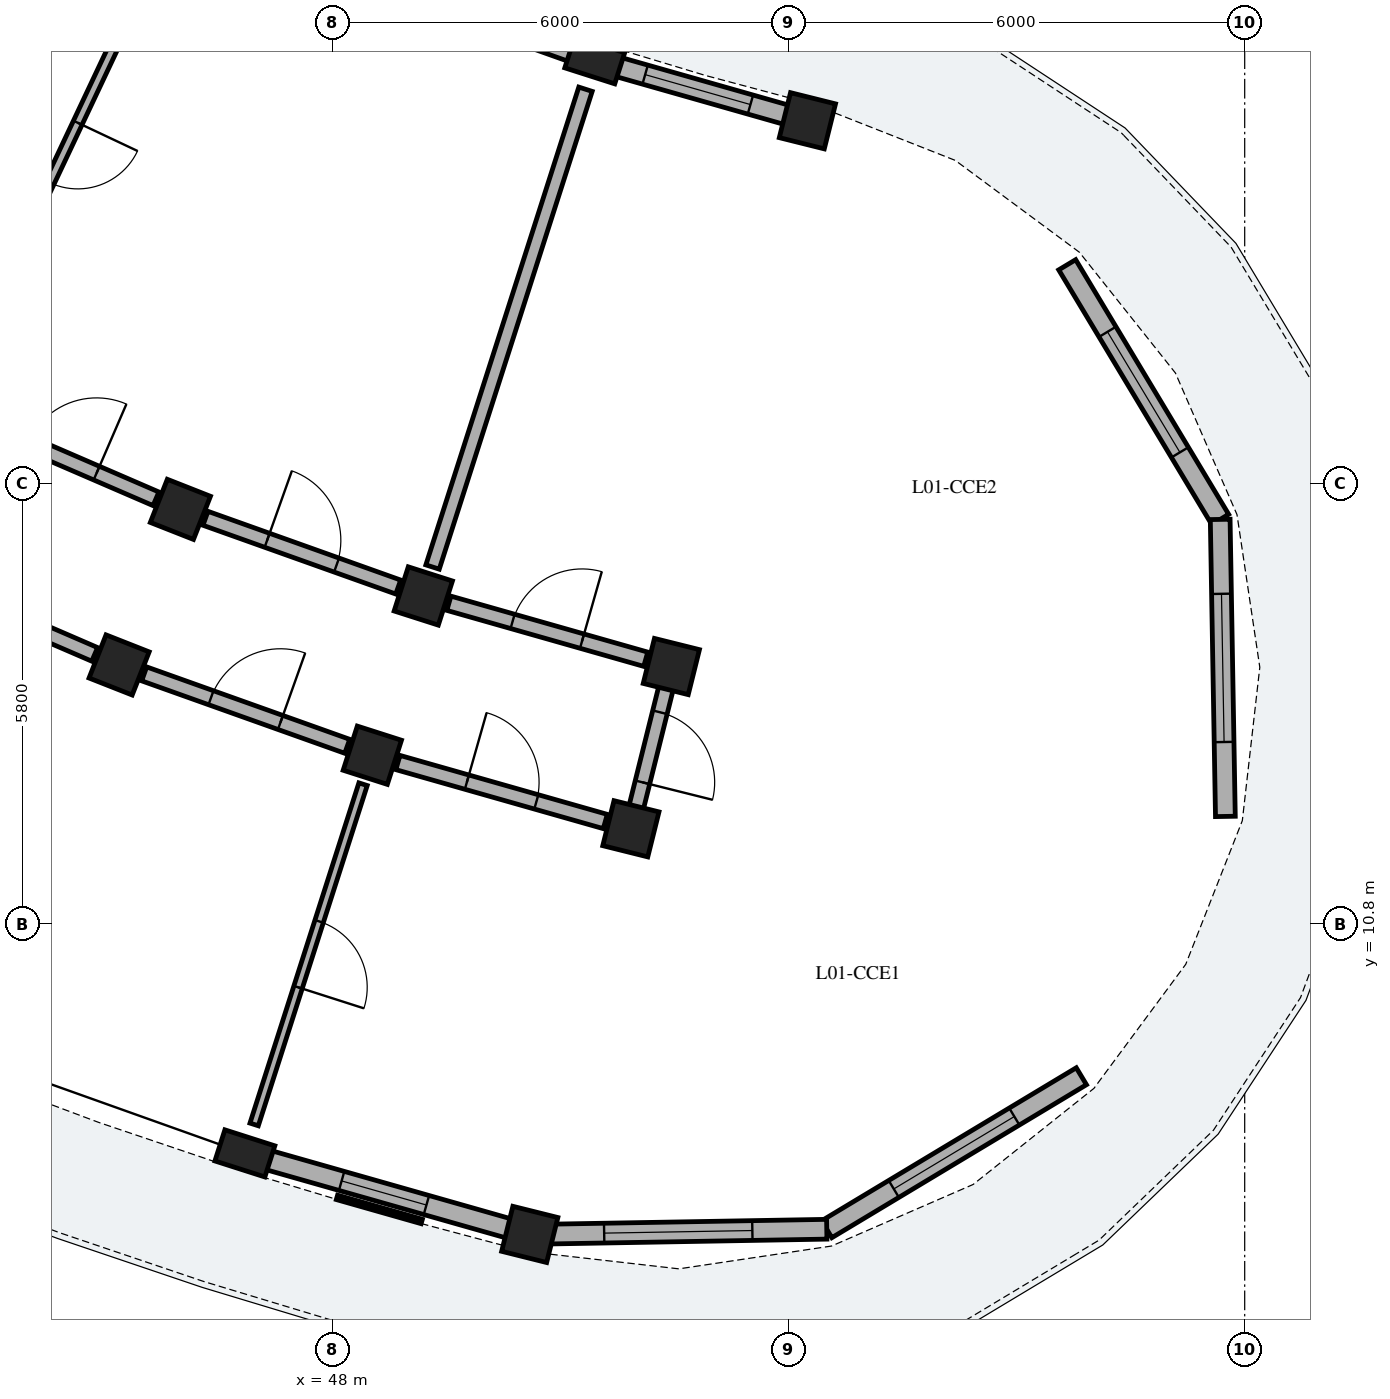
"""IFC4 building model, lengths in metres.
Left out: names, types, materials, properties, quantities, classifications, styles, units other than length and angle.
Written with IfcOpenShell. Run it as: python <this file> out.ifc"""

import sys

from ifc_helpers import new_model, si_unit, direction, frame, frame_2d, origin, origin_2d, place, context, subcontext, project, spatial, rectangle, extrude, element, fill, save


model = new_model("IFC4")
c1 = context("Model", 3, precision=1e-05, world=origin(), true_north=direction((0.0, 1.0)))
c2 = subcontext(c1, "Body", "Model", "MODEL_VIEW")
j1 = project(units=[si_unit("LENGTHUNIT", "METRE"), si_unit("PLANEANGLEUNIT", "RADIAN")], contexts=[c1])
p1 = place(None, origin())
s1 = spatial("IfcSite", under=j1, at=p1, CompositionType="ELEMENT")
p2 = place(p1, origin())
s2 = spatial("IfcBuilding", under=s1, at=p2, CompositionType="ELEMENT")
p3 = place(p2, frame((0.0, 0.0, 4.76)))
s3 = spatial("IfcBuildingStorey", under=s2, at=p3, CompositionType="ELEMENT", Elevation=4.76)
for number, where, z_axis, x_axis in (
    (1, (45.997, 16.258, 0.0), (0.0, 0.0, 1.0), (-0.367, -0.93, 0.0)),
    (2, (45.191, 14.211, 0.0), (0.0, 0.0, 1.0), (-0.367, -0.93, 0.0)),
):
    element("IfcColumn", number, at=place(p3, frame(where, z_axis=z_axis, x_axis=x_axis)), inside=s3, PredefinedType="COLUMN", context=c2, shape_type="SweptSolid", body=[
        extrude(rectangle(XDim=0.61, YDim=0.61, at=origin_2d()), origin(), (0.0, 0.0, 1.0), 3.825),
    ])
p4 = place(p3, frame((51.449, 22.166, 0.0), z_axis=(0.0, 0.0, 1.0), x_axis=(-0.304864299028, -0.952395799643, 0.0)))
e3 = element("IfcColumn", 3, at=p4, inside=s3, PredefinedType="PILASTER", context=c2, shape_type="SweptSolid", body=[
    extrude(rectangle(XDim=0.43, YDim=0.69, at=origin_2d()), origin(), (0.0, 0.0, 1.0), 3.825),
])
for number, where, z_axis, x_axis in (
    (4, (49.193, 15.118, 0.0), (0.0, 0.0, 1.0), (-0.305, -0.952, 0.0)),
    (5, (48.522, 13.023, 0.0), (0.0, 0.0, 1.0), (-0.305, -0.952, 0.0)),
):
    element("IfcColumn", number, at=place(p3, frame(where, z_axis=z_axis, x_axis=x_axis)), inside=s3, PredefinedType="COLUMN", context=c2, shape_type="SweptSolid", body=[
        extrude(rectangle(XDim=0.61, YDim=0.61, at=origin_2d()), origin(), (0.0, 0.0, 1.0), 3.825),
    ])
p5 = place(p3, frame((46.845, 7.785, 0.0), z_axis=(0.0, 0.0, 1.0), x_axis=(-0.304864299028, -0.952395799643, 0.0)))
e6 = element("IfcColumn", 6, at=p5, inside=s3, PredefinedType="PILASTER", context=c2, shape_type="SweptSolid", body=[
    extrude(rectangle(XDim=0.43, YDim=0.69, at=origin_2d()), origin(), (0.0, 0.0, 1.0), 3.825),
])
for number, where, z_axis, x_axis in (
    (7, (54.247, 21.37, 0.0), (0.0, 0.0, 1.0), (-0.242, -0.97, 0.0)),
    (8, (52.456, 14.19, 0.0), (0.0, 0.0, 1.0), (-0.242, -0.97, 0.0)),
    (9, (51.924, 12.055, 0.0), (0.0, 0.0, 1.0), (-0.242, -0.97, 0.0)),
    (10, (50.594, 6.719, 0.0), (0.0, 0.0, 1.0), (-0.242, -0.97, 0.0)),
):
    element("IfcColumn", number, at=place(p3, frame(where, z_axis=z_axis, x_axis=x_axis)), inside=s3, PredefinedType="COLUMN", context=c2, shape_type="SweptSolid", body=[
        extrude(rectangle(XDim=0.61, YDim=0.61, at=origin_2d()), origin(), (0.0, 0.0, 1.0), 3.825),
    ])
p6 = place(p3, frame((48.968, 23.051, 0.0), z_axis=(0.0, 0.0, 1.0), x_axis=(0.941897456242, -0.335900553623, 0.0)))
e11 = element("IfcWall", 11, at=p6, inside=s3, PredefinedType="SOLIDWALL", context=c2, shape_type="SweptSolid", body=[
    extrude(rectangle(XDim=2.449, YDim=0.26, at=frame_2d((1.224, 0.0))), origin(), (0.0, 0.0, 1.0), 3.075),
])
p7 = place(p6, frame((0.734, 0.0, 0.0)))
e12 = element("IfcOpeningElement", 12, at=p7, cuts=e11, PredefinedType="OPENING", context=c2, shape_type="SweptSolid", body=[
    extrude(rectangle(XDim=0.98, YDim=2.12, at=frame_2d((0.49, 1.06))), frame((0.0, 0.14, 0.0), z_axis=(0.0, -1.0, 0.0), x_axis=(1.0, 0.0, 0.0)), (0.0, 0.0, 1.0), 0.28),
])
p8 = place(p3, frame((47.023, 7.734, 0.0), z_axis=(0.0, 0.0, 1.0), x_axis=(0.961876981915, -0.273482488766, 0.0)))
e13 = element("IfcWall", 13, at=p8, inside=s3, PredefinedType="SOLIDWALL", context=c2, shape_type="SweptSolid", body=[
    extrude(rectangle(XDim=3.437, YDim=0.26, at=frame_2d((1.719, 0.0))), origin(), (0.0, 0.0, 1.0), 3.075),
])
p9 = place(p8, frame((1.138, 0.0, 0.55)))
e14 = element("IfcOpeningElement", 14, at=p9, cuts=e13, PredefinedType="OPENING", context=c2, shape_type="SweptSolid", body=[
    extrude(rectangle(XDim=1.16, YDim=1.485, at=frame_2d((0.58, 0.743))), frame((0.0, 0.14, 0.0), z_axis=(0.0, -1.0, 0.0), x_axis=(1.0, 0.0, 0.0)), (0.0, 0.0, 1.0), 0.28),
])
p10 = place(p3, frame((51.627, 22.115, 0.0), z_axis=(0.0, 0.0, 1.0), x_axis=(0.961854311059, -0.273562212847, 0.0)))
e15 = element("IfcWall", 15, at=p10, inside=s3, PredefinedType="SOLIDWALL", context=c2, shape_type="SweptSolid", body=[
    extrude(rectangle(XDim=2.449, YDim=0.26, at=frame_2d((1.225, 0.0))), origin(), (0.0, 0.0, 1.0), 3.075),
])
p11 = place(p10, frame((0.504, 0.0, 0.55)))
e16 = element("IfcOpeningElement", 16, at=p11, cuts=e15, PredefinedType="OPENING", context=c2, shape_type="SweptSolid", body=[
    extrude(rectangle(XDim=1.44, YDim=1.66, at=frame_2d((0.72, 0.83))), frame((0.0, 0.14, 0.0), z_axis=(0.0, -1.0, 0.0), x_axis=(1.0, 0.0, 0.0)), (0.0, 0.0, 1.0), 0.28),
])
p12 = place(p3, frame((57.665, 19.476, 0.0), z_axis=(0.0, 0.0, 1.0), x_axis=(0.515019321998, -0.857178568309, 0.0)))
e17 = element("IfcWall", 17, at=p12, inside=s3, PredefinedType="SOLIDWALL", context=c2, shape_type="SweptSolid", body=[
    extrude(rectangle(XDim=3.908, YDim=0.26, at=frame_2d((1.954, 0.0))), origin(), (0.0, 0.0, 1.0), 3.075),
])
p13 = place(p12, frame((1.029, 0.0, 0.4)))
e18 = element("IfcOpeningElement", 18, at=p13, cuts=e17, PredefinedType="OPENING", context=c2, shape_type="SweptSolid", body=[
    extrude(rectangle(XDim=1.85, YDim=1.72, at=frame_2d((0.925, 0.86))), frame((0.0, 0.14, 0.0), z_axis=(0.0, -1.0, 0.0), x_axis=(1.0, 0.0, 0.0)), (0.0, 0.0, 1.0), 0.28),
])
p14 = place(p3, frame((59.677, 16.126, 0.0), z_axis=(0.0, 0.0, 1.0), x_axis=(0.017490763899, -0.999847024888, 0.0)))
e19 = element("IfcWall", 19, at=p14, inside=s3, PredefinedType="SOLIDWALL", context=c2, shape_type="SweptSolid", body=[
    extrude(rectangle(XDim=3.908, YDim=0.26, at=frame_2d((1.954, 0.0))), origin(), (0.0, 0.0, 1.0), 3.075),
])
p15 = place(p14, frame((0.979, 0.0, 0.4)))
e20 = element("IfcOpeningElement", 20, at=p15, cuts=e19, PredefinedType="OPENING", context=c2, shape_type="SweptSolid", body=[
    extrude(rectangle(XDim=1.95, YDim=1.78, at=frame_2d((0.975, 0.89))), frame((0.0, 0.14, 0.0), z_axis=(0.0, -1.0, 0.0), x_axis=(1.0, 0.0, 0.0)), (0.0, 0.0, 1.0), 0.28),
])
p16 = place(p3, frame((57.851, 8.8, 0.0), z_axis=(0.0, 0.0, 1.0), x_axis=(-0.85715098885, -0.515065221417, 0.0)))
e21 = element("IfcWall", 21, at=p16, inside=s3, PredefinedType="SOLIDWALL", context=c2, shape_type="SweptSolid", body=[
    extrude(rectangle(XDim=3.908, YDim=0.26, at=frame_2d((1.954, 0.0))), origin(), (0.0, 0.0, 1.0), 3.075),
])
p17 = place(p16, frame((1.029, 0.0, 0.4)))
e22 = element("IfcOpeningElement", 22, at=p17, cuts=e21, PredefinedType="OPENING", context=c2, shape_type="SweptSolid", body=[
    extrude(rectangle(XDim=1.85, YDim=1.72, at=frame_2d((0.925, 0.86))), frame((0.0, 0.14, 0.0), z_axis=(0.0, -1.0, 0.0), x_axis=(1.0, 0.0, 0.0)), (0.0, 0.0, 1.0), 0.28),
])
p18 = place(p3, frame((54.501, 6.787, 0.0), z_axis=(0.0, 0.0, 1.0), x_axis=(-0.999848115368, -0.017428315893, 0.0)))
e23 = element("IfcWall", 23, at=p18, inside=s3, PredefinedType="SOLIDWALL", context=c2, shape_type="SweptSolid", body=[
    extrude(rectangle(XDim=3.908, YDim=0.26, at=frame_2d((1.954, 0.0))), origin(), (0.0, 0.0, 1.0), 3.075),
])
p19 = place(p18, frame((0.979, 0.0, 0.4)))
e24 = element("IfcOpeningElement", 24, at=p19, cuts=e23, PredefinedType="OPENING", context=c2, shape_type="SweptSolid", body=[
    extrude(rectangle(XDim=1.95, YDim=1.78, at=frame_2d((0.975, 0.89))), frame((0.0, 0.14, 0.0), z_axis=(0.0, -1.0, 0.0), x_axis=(1.0, 0.0, 0.0)), (0.0, 0.0, 1.0), 0.28),
])
p20 = place(p3, frame((45.868, 23.935, 0.0), z_axis=(0.0, 0.0, 1.0), x_axis=(-0.426573573579, -0.904452865728, 0.0)))
e25 = element("IfcWall", 25, at=p20, inside=s3, PredefinedType="PARTITIONING", context=c2, shape_type="SweptSolid", body=[
    extrude(rectangle(XDim=6.6, YDim=0.125, at=frame_2d((3.3, 0.0))), origin(), (0.0, 0.0, 1.0), 3.09),
])
p21 = place(p20, frame((2.865, 0.0, 0.0)))
e26 = element("IfcOpeningElement", 26, at=p21, cuts=e25, PredefinedType="OPENING", context=c2, shape_type="SweptSolid", body=[
    extrude(rectangle(XDim=0.87, YDim=2.08, at=frame_2d((0.435, 1.04))), frame((0.0, 0.073, 0.0), z_axis=(0.0, -1.0, 0.0), x_axis=(1.0, 0.0, 0.0)), (0.0, 0.0, 1.0), 0.145),
])
p22 = place(p3, frame((42.265, 15.475, 0.0), z_axis=(0.0, 0.0, 1.0), x_axis=(0.917943439406, -0.396711282991, 0.0)))
e27 = element("IfcWall", 27, at=p22, inside=s3, PredefinedType="PARTITIONING", context=c2, shape_type="SweptSolid", body=[
    extrude(rectangle(XDim=2.837, YDim=0.195, at=frame_2d((1.418, 0.0))), origin(), (0.0, 0.0, 1.0), 3.09),
])
p23 = place(p22, frame((0.924, 0.0, 0.0)))
e28 = element("IfcOpeningElement", 28, at=p23, cuts=e27, PredefinedType="OPENING", context=c2, shape_type="SweptSolid", body=[
    extrude(rectangle(XDim=0.99, YDim=2.16, at=frame_2d((0.495, 1.08))), frame((0.0, 0.107, 0.0), z_axis=(0.0, -1.0, 0.0), x_axis=(1.0, 0.0, 0.0)), (0.0, 0.0, 1.0), 0.215),
])
p24 = place(p3, frame((43.204, 17.465, 0.0), z_axis=(0.0, 0.0, 1.0), x_axis=(0.91793557165, -0.39672948756, 0.0)))
e29 = element("IfcWall", 29, at=p24, inside=s3, PredefinedType="PARTITIONING", context=c2, shape_type="SweptSolid", body=[
    extrude(rectangle(XDim=2.693, YDim=0.195, at=frame_2d((1.346, 0.0))), origin(), (0.0, 0.0, 1.0), 3.09),
])
p25 = place(p24, frame((0.852, 0.0, 0.0)))
e30 = element("IfcOpeningElement", 30, at=p25, cuts=e29, PredefinedType="OPENING", context=c2, shape_type="SweptSolid", body=[
    extrude(rectangle(XDim=0.99, YDim=2.16, at=frame_2d((0.495, 1.08))), frame((0.0, 0.107, 0.0), z_axis=(0.0, -1.0, 0.0), x_axis=(1.0, 0.0, 0.0)), (0.0, 0.0, 1.0), 0.215),
])
p26 = place(p3, frame((45.52, 14.093, 0.0), z_axis=(0.0, 0.0, 1.0), x_axis=(0.941930628611, -0.335807520589, 0.0)))
e31 = element("IfcWall", 31, at=p26, inside=s3, PredefinedType="PARTITIONING", context=c2, shape_type="SweptSolid", body=[
    extrude(rectangle(XDim=2.837, YDim=0.195, at=frame_2d((1.418, 0.0))), origin(), (0.0, 0.0, 1.0), 3.09),
])
p27 = place(p26, frame((0.934, 0.0, 0.0)))
e32 = element("IfcOpeningElement", 32, at=p27, cuts=e31, PredefinedType="OPENING", context=c2, shape_type="SweptSolid", body=[
    extrude(rectangle(XDim=0.97, YDim=2.15, at=frame_2d((0.485, 1.075))), frame((0.0, 0.107, 0.0), z_axis=(0.0, -1.0, 0.0), x_axis=(1.0, 0.0, 0.0)), (0.0, 0.0, 1.0), 0.215),
])
p28 = place(p3, frame((46.327, 16.14, 0.0), z_axis=(0.0, 0.0, 1.0), x_axis=(0.941895652647, -0.335905611036, 0.0)))
e33 = element("IfcWall", 33, at=p28, inside=s3, PredefinedType="PARTITIONING", context=c2, shape_type="SweptSolid", body=[
    extrude(rectangle(XDim=2.693, YDim=0.195, at=frame_2d((1.346, 0.0))), origin(), (0.0, 0.0, 1.0), 3.09),
])
p29 = place(p28, frame((0.862, 0.0, 0.0)))
e34 = element("IfcOpeningElement", 34, at=p29, cuts=e33, PredefinedType="OPENING", context=c2, shape_type="SweptSolid", body=[
    extrude(rectangle(XDim=0.97, YDim=2.15, at=frame_2d((0.485, 1.075))), frame((0.0, 0.107, 0.0), z_axis=(0.0, -1.0, 0.0), x_axis=(1.0, 0.0, 0.0)), (0.0, 0.0, 1.0), 0.215),
])
p30 = place(p3, frame((48.4, 12.642, 0.0), z_axis=(0.0, 0.0, 1.0), x_axis=(-0.304860540454, -0.952397002764, 0.0)))
e35 = element("IfcWall", 35, at=p30, inside=s3, PredefinedType="PARTITIONING", context=c2, shape_type="SweptSolid", body=[
    extrude(rectangle(XDim=4.7, YDim=0.115, at=frame_2d((2.35, 0.0))), origin(), (0.0, 0.0, 1.0), 3.09),
])
p31 = place(p30, frame((1.895, 0.0, 0.0)))
e36 = element("IfcOpeningElement", 36, at=p31, cuts=e35, PredefinedType="OPENING", context=c2, shape_type="SweptSolid", body=[
    extrude(rectangle(XDim=0.91, YDim=2.1, at=frame_2d((0.455, 1.05))), frame((0.0, 0.067, 0.0), z_axis=(0.0, -1.0, 0.0), x_axis=(1.0, 0.0, 0.0)), (0.0, 0.0, 1.0), 0.135),
])
p32 = place(p3, frame((51.327, 21.785, 0.0), z_axis=(0.0, 0.0, 1.0), x_axis=(-0.304875046605, -0.95239235925, 0.0)))
e37 = element("IfcWall", 37, at=p32, inside=s3, PredefinedType="PARTITIONING", context=c2, shape_type="SweptSolid", body=[
    extrude(rectangle(XDim=6.6, YDim=0.185, at=frame_2d((3.3, 0.0))), origin(), (0.0, 0.0, 1.0), 3.09),
])
p33 = place(p3, frame((48.859, 12.927, 0.0), z_axis=(0.0, 0.0, 1.0), x_axis=(0.961873892319, -0.273493355085, 0.0)))
e38 = element("IfcWall", 38, at=p33, inside=s3, PredefinedType="PARTITIONING", context=c2, shape_type="SweptSolid", body=[
    extrude(rectangle(XDim=2.837, YDim=0.195, at=frame_2d((1.418, 0.0))), origin(), (0.0, 0.0, 1.0), 3.09),
])
p34 = place(p33, frame((0.944, 0.0, 0.0)))
e39 = element("IfcOpeningElement", 39, at=p34, cuts=e38, PredefinedType="OPENING", context=c2, shape_type="SweptSolid", body=[
    extrude(rectangle(XDim=0.95, YDim=2.13, at=frame_2d((0.475, 1.065))), frame((0.0, 0.107, 0.0), z_axis=(0.0, -1.0, 0.0), x_axis=(1.0, 0.0, 0.0)), (0.0, 0.0, 1.0), 0.215),
])
p35 = place(p3, frame((49.53, 15.022, 0.0), z_axis=(0.0, 0.0, 1.0), x_axis=(0.961861926514, -0.273535435224, 0.0)))
e40 = element("IfcWall", 40, at=p35, inside=s3, PredefinedType="PARTITIONING", context=c2, shape_type="SweptSolid", body=[
    extrude(rectangle(XDim=2.693, YDim=0.195, at=frame_2d((1.346, 0.0))), origin(), (0.0, 0.0, 1.0), 3.09),
])
p36 = place(p35, frame((0.872, 0.0, 0.0)))
e41 = element("IfcOpeningElement", 41, at=p36, cuts=e40, PredefinedType="OPENING", context=c2, shape_type="SweptSolid", body=[
    extrude(rectangle(XDim=0.95, YDim=2.13, at=frame_2d((0.475, 1.065))), frame((0.0, 0.107, 0.0), z_axis=(0.0, -1.0, 0.0), x_axis=(1.0, 0.0, 0.0)), (0.0, 0.0, 1.0), 0.215),
])
p37 = place(p3, frame((52.444, 14.142, 0.0), z_axis=(0.0, 0.0, 1.0), x_axis=(-0.241933770084, -0.970292765557, 0.0)))
e42 = element("IfcWall", 42, at=p37, inside=s3, PredefinedType="PARTITIONING", context=c2, shape_type="SweptSolid", body=[
    extrude(rectangle(XDim=2.1, YDim=0.195, at=frame_2d((1.05, 0.0))), origin(), (0.0, 0.0, 1.0), 3.09),
])
p38 = place(p37, frame((0.57, 0.0, 0.0)))
e43 = element("IfcOpeningElement", 43, at=p38, cuts=e42, PredefinedType="OPENING", context=c2, shape_type="SweptSolid", body=[
    extrude(rectangle(XDim=0.95, YDim=2.13, at=frame_2d((0.475, 1.065))), frame((0.0, 0.107, 0.0), z_axis=(0.0, -1.0, 0.0), x_axis=(1.0, 0.0, 0.0)), (0.0, 0.0, 1.0), 0.215),
])
p39 = place(p9, origin())
e44 = element("IfcWindow", 44, at=p39, inside=s3, PartitioningType="SINGLE_PANEL", PredefinedType="WINDOW", context=c2, shape_type="SweptSolid", body=[
    extrude(rectangle(XDim=1.16, YDim=1.485, at=frame_2d((0.58, 0.743))), frame((0.0, 0.03, 0.0), z_axis=(0.0, -1.0, 0.0), x_axis=(1.0, 0.0, 0.0)), (0.0, 0.0, 1.0), 0.06),
])
fill(e14, e44)
p40 = place(p11, origin())
e45 = element("IfcWindow", 45, at=p40, inside=s3, PartitioningType="SINGLE_PANEL", PredefinedType="WINDOW", context=c2, shape_type="SweptSolid", body=[
    extrude(rectangle(XDim=1.44, YDim=1.66, at=frame_2d((0.72, 0.83))), frame((0.0, 0.03, 0.0), z_axis=(0.0, -1.0, 0.0), x_axis=(1.0, 0.0, 0.0)), (0.0, 0.0, 1.0), 0.06),
])
fill(e16, e45)
p41 = place(p13, origin())
e46 = element("IfcWindow", 46, at=p41, inside=s3, PartitioningType="SINGLE_PANEL", PredefinedType="WINDOW", context=c2, shape_type="SweptSolid", body=[
    extrude(rectangle(XDim=1.85, YDim=1.72, at=frame_2d((0.925, 0.86))), frame((0.0, 0.03, 0.0), z_axis=(0.0, -1.0, 0.0), x_axis=(1.0, 0.0, 0.0)), (0.0, 0.0, 1.0), 0.06),
])
fill(e18, e46)
p42 = place(p15, origin())
e47 = element("IfcWindow", 47, at=p42, inside=s3, PartitioningType="SINGLE_PANEL", PredefinedType="WINDOW", context=c2, shape_type="SweptSolid", body=[
    extrude(rectangle(XDim=1.95, YDim=1.78, at=frame_2d((0.975, 0.89))), frame((0.0, 0.03, 0.0), z_axis=(0.0, -1.0, 0.0), x_axis=(1.0, 0.0, 0.0)), (0.0, 0.0, 1.0), 0.06),
])
fill(e20, e47)
p43 = place(p17, origin())
e48 = element("IfcWindow", 48, at=p43, inside=s3, PartitioningType="SINGLE_PANEL", PredefinedType="WINDOW", context=c2, shape_type="SweptSolid", body=[
    extrude(rectangle(XDim=1.85, YDim=1.72, at=frame_2d((0.925, 0.86))), frame((0.0, 0.03, 0.0), z_axis=(0.0, -1.0, 0.0), x_axis=(1.0, 0.0, 0.0)), (0.0, 0.0, 1.0), 0.06),
])
fill(e22, e48)
p44 = place(p19, origin())
e49 = element("IfcWindow", 49, at=p44, inside=s3, PartitioningType="SINGLE_PANEL", PredefinedType="WINDOW", context=c2, shape_type="SweptSolid", body=[
    extrude(rectangle(XDim=1.95, YDim=1.78, at=frame_2d((0.975, 0.89))), frame((0.0, 0.03, 0.0), z_axis=(0.0, -1.0, 0.0), x_axis=(1.0, 0.0, 0.0)), (0.0, 0.0, 1.0), 0.06),
])
fill(e24, e49)
p45 = place(p21, origin())
e50 = element("IfcDoor", 50, at=p45, inside=s3, OperationType="SINGLE_SWING_LEFT", PredefinedType="DOOR", context=c2, shape_type="SweptSolid", body=[
    extrude(rectangle(XDim=0.87, YDim=2.08, at=frame_2d((0.435, 1.04))), frame((0.0, 0.025, 0.0), z_axis=(0.0, -1.0, 0.0), x_axis=(1.0, 0.0, 0.0)), (0.0, 0.0, 1.0), 0.05),
])
fill(e26, e50)
p46 = place(p25, origin())
e51 = element("IfcDoor", 51, at=p46, inside=s3, OperationType="SINGLE_SWING_RIGHT", PredefinedType="DOOR", context=c2, shape_type="SweptSolid", body=[
    extrude(rectangle(XDim=0.99, YDim=2.16, at=frame_2d((0.495, 1.08))), frame((0.0, 0.025, 0.0), z_axis=(0.0, -1.0, 0.0), x_axis=(1.0, 0.0, 0.0)), (0.0, 0.0, 1.0), 0.05),
])
fill(e30, e51)
p47 = place(p27, origin())
e52 = element("IfcDoor", 52, at=p47, inside=s3, OperationType="SINGLE_SWING_RIGHT", PredefinedType="DOOR", context=c2, shape_type="SweptSolid", body=[
    extrude(rectangle(XDim=0.97, YDim=2.15, at=frame_2d((0.485, 1.075))), frame((0.0, 0.025, 0.0), z_axis=(0.0, -1.0, 0.0), x_axis=(1.0, 0.0, 0.0)), (0.0, 0.0, 1.0), 0.05),
])
fill(e32, e52)
p48 = place(p29, origin())
e53 = element("IfcDoor", 53, at=p48, inside=s3, OperationType="SINGLE_SWING_LEFT", PredefinedType="DOOR", context=c2, shape_type="SweptSolid", body=[
    extrude(rectangle(XDim=0.97, YDim=2.15, at=frame_2d((0.485, 1.075))), frame((0.0, 0.025, 0.0), z_axis=(0.0, -1.0, 0.0), x_axis=(1.0, 0.0, 0.0)), (0.0, 0.0, 1.0), 0.05),
])
fill(e34, e53)
p49 = place(p31, origin())
e54 = element("IfcDoor", 54, at=p49, inside=s3, OperationType="SINGLE_SWING_RIGHT", PredefinedType="DOOR", context=c2, shape_type="SweptSolid", body=[
    extrude(rectangle(XDim=0.91, YDim=2.1, at=frame_2d((0.455, 1.05))), frame((0.0, 0.025, 0.0), z_axis=(0.0, -1.0, 0.0), x_axis=(1.0, 0.0, 0.0)), (0.0, 0.0, 1.0), 0.05),
])
fill(e36, e54)
p50 = place(p34, origin())
e55 = element("IfcDoor", 55, at=p50, inside=s3, OperationType="SINGLE_SWING_LEFT", PredefinedType="DOOR", context=c2, shape_type="SweptSolid", body=[
    extrude(rectangle(XDim=0.95, YDim=2.13, at=frame_2d((0.475, 1.065))), frame((0.0, 0.025, 0.0), z_axis=(0.0, -1.0, 0.0), x_axis=(1.0, 0.0, 0.0)), (0.0, 0.0, 1.0), 0.05),
])
fill(e39, e55)
p51 = place(p36, origin())
e56 = element("IfcDoor", 56, at=p51, inside=s3, OperationType="SINGLE_SWING_RIGHT", PredefinedType="DOOR", context=c2, shape_type="SweptSolid", body=[
    extrude(rectangle(XDim=0.95, YDim=2.13, at=frame_2d((0.475, 1.065))), frame((0.0, 0.025, 0.0), z_axis=(0.0, -1.0, 0.0), x_axis=(1.0, 0.0, 0.0)), (0.0, 0.0, 1.0), 0.05),
])
fill(e41, e56)
p52 = place(p38, origin())
e57 = element("IfcDoor", 57, at=p52, inside=s3, OperationType="SINGLE_SWING_RIGHT", PredefinedType="DOOR", context=c2, shape_type="SweptSolid", body=[
    extrude(rectangle(XDim=0.95, YDim=2.13, at=frame_2d((0.475, 1.065))), frame((0.0, 0.025, 0.0), z_axis=(0.0, -1.0, 0.0), x_axis=(1.0, 0.0, 0.0)), (0.0, 0.0, 1.0), 0.05),
])
fill(e43, e57)
save(model, sys.argv[1])
